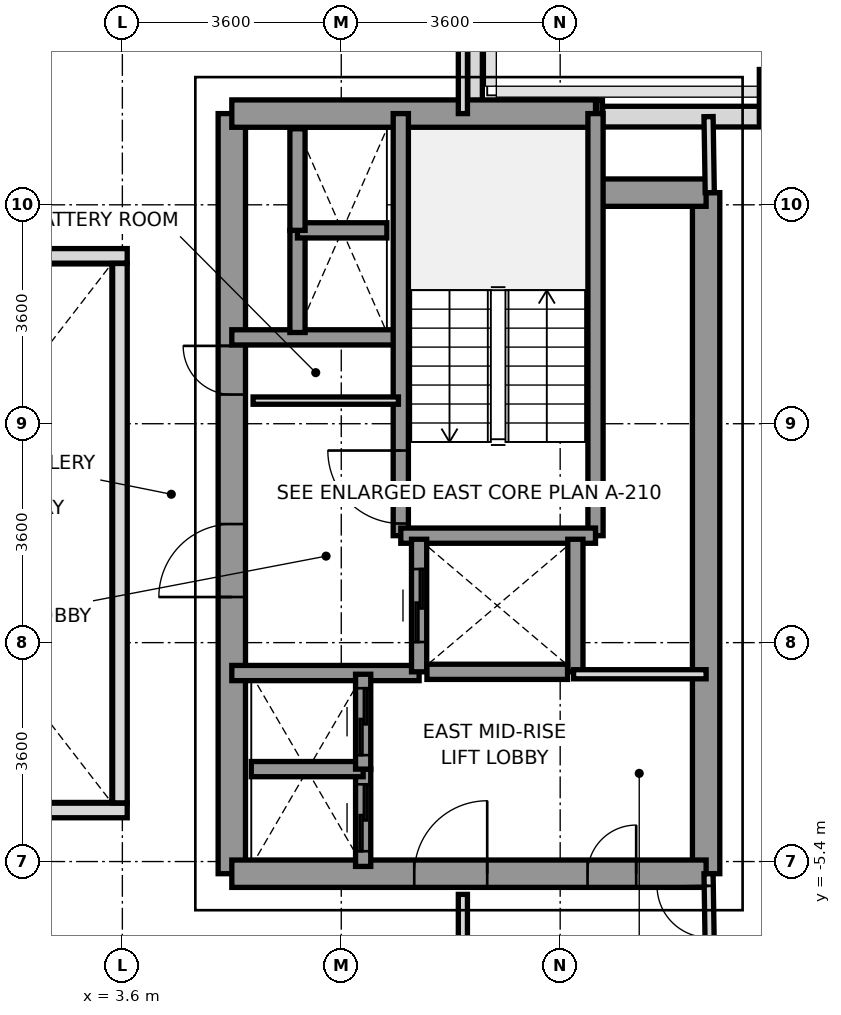
"""IFC4 building model, lengths in metres.
Left out: names, types, materials, properties, quantities, classifications, styles, units other than length and angle.
Written with IfcOpenShell. Run it as: python <this file> out.ifc"""

import sys

from ifc_helpers import new_model, si_unit, direction, frame, frame_2d, origin, origin_2d, place, context, subcontext, project, spatial, rectangle, extrude, source, transform, mapped, element, fill, save


model = new_model("IFC4")
c1 = context("Model", 3, precision=1e-05, world=origin(), true_north=direction((0.0, 1.0)))
c2 = subcontext(c1, "Body", "Model", "MODEL_VIEW")
j1 = project(units=[si_unit("LENGTHUNIT", "METRE"), si_unit("PLANEANGLEUNIT", "RADIAN")], contexts=[c1])
p1 = place(None, origin())
s1 = spatial("IfcSite", under=j1, at=p1, CompositionType="ELEMENT")
p2 = place(p1, origin())
s2 = spatial("IfcBuilding", under=s1, at=p2, CompositionType="ELEMENT")
p3 = place(p2, frame((0.0, 0.0, 138.0)))
s3 = spatial("IfcBuildingStorey", under=s2, at=p3, CompositionType="ELEMENT", Elevation=138.0)
m1 = source(origin(), c2, "Body", "SweptSolid", [
    extrude(rectangle(XDim=0.65, YDim=0.85, at=origin_2d()), origin(), (0.0, 0.0, 1.0), 3.2),
])
p4 = place(p3, frame((14.4, 7.2, 0.0), z_axis=(0.0, 0.0, 1.0), x_axis=(1.0, 0.0, 0.0)))
e1 = element("IfcColumn", 1, at=p4, inside=s3, PredefinedType="COLUMN", context=c2, shape_type="MappedRepresentation", body=[
    mapped(m1, transform((0.0, 0.0, 0.0), x_axis=(1.0, 0.0, 0.0), y_axis=(0.0, 1.0, 0.0), z_axis=(0.0, 0.0, 1.0), scale=1.0)),
])
p5 = place(p3, frame((11.498, 6.85, 0.0), z_axis=(0.0, 0.0, 1.0), x_axis=(1.0, 0.0, 0.0)))
e2 = element("IfcWall", 2, at=p5, inside=s3, PredefinedType="SOLIDWALL", context=c2, shape_type="SweptSolid", body=[
    extrude(rectangle(XDim=2.585, YDim=0.34, at=frame_2d((1.292, 0.0))), origin(), (0.0, 0.0, 1.0), 3.2),
])
p6 = place(p3, frame((9.4, 8.472, 0.0), z_axis=(0.0, 0.0, 1.0), x_axis=(0.0, -1.0, 0.0)))
e3 = element("IfcWall", 3, at=p6, inside=s3, PredefinedType="PARAPET", context=c2, shape_type="SweptSolid", body=[
    extrude(rectangle(XDim=1.519, YDim=0.24, at=frame_2d((0.76, 0.0))), origin(), (0.0, 0.0, 1.0), 1.15),
])
p7 = place(p3, frame((11.403, 7.0, 0.0), z_axis=(0.0, 0.0, 1.0), x_axis=(1.0, 0.0, 0.0)))
e4 = element("IfcWall", 4, at=p7, inside=s3, PredefinedType="PARAPET", context=c2, shape_type="SweptSolid", body=[
    extrude(rectangle(XDim=0.092, YDim=0.24, at=frame_2d((0.046, 0.0))), origin(), (0.0, 0.0, 1.0), 1.15),
])
p8 = place(p3, frame((13.2, -5.6, 0.0), z_axis=(0.0, 0.0, 1.0), x_axis=(0.0, 1.0, 0.0)))
e5 = element("IfcWall", 5, at=p8, inside=s3, PredefinedType="SHEAR", context=c2, shape_type="SweptSolid", body=[
    extrude(rectangle(XDim=11.2, YDim=0.45, at=frame_2d((5.6, 0.0))), origin(), (0.0, 0.0, 1.0), 3.2),
])
p9 = place(p3, frame((5.4, -5.6, 0.0), z_axis=(0.0, 0.0, 1.0), x_axis=(0.0, 1.0, 0.0)))
e6 = element("IfcWall", 6, at=p9, inside=s3, PredefinedType="SHEAR", context=c2, shape_type="SweptSolid", body=[
    extrude(rectangle(XDim=12.5, YDim=0.45, at=frame_2d((6.25, 0.0))), origin(), (0.0, 0.0, 1.0), 3.2),
])
p10 = place(p9, frame((4.55, 0.0, 0.0)))
e7 = element("IfcOpeningElement", 7, at=p10, cuts=e6, PredefinedType="OPENING", context=c2, shape_type="SweptSolid", body=[
    extrude(rectangle(XDim=1.2, YDim=2.2, at=frame_2d((0.6, 1.1))), frame((0.0, 0.235, 0.0), z_axis=(0.0, -1.0, 0.0), x_axis=(1.0, 0.0, 0.0)), (0.0, 0.0, 1.0), 0.47),
])
p11 = place(p9, frame((7.88, 0.0, 0.0)))
e8 = element("IfcOpeningElement", 8, at=p11, cuts=e6, PredefinedType="OPENING", context=c2, shape_type="SweptSolid", body=[
    extrude(rectangle(XDim=0.8, YDim=2.1, at=frame_2d((0.4, 1.05))), frame((0.0, 0.235, 0.0), z_axis=(0.0, -1.0, 0.0), x_axis=(1.0, 0.0, 0.0)), (0.0, 0.0, 1.0), 0.47),
])
p12 = place(p3, frame((5.4, 6.9, 0.0), z_axis=(0.0, 0.0, 1.0), x_axis=(1.0, 0.0, 0.0)))
e9 = element("IfcWall", 9, at=p12, inside=s3, PredefinedType="SHEAR", context=c2, shape_type="SweptSolid", body=[
    extrude(rectangle(XDim=5.981, YDim=0.45, at=frame_2d((2.991, 0.0))), origin(), (0.0, 0.0, 1.0), 3.2),
])
p13 = place(p3, frame((11.381, 5.6, 0.0), z_axis=(0.0, 0.0, 1.0), x_axis=(1.0, 0.0, 0.0)))
e10 = element("IfcWall", 10, at=p13, inside=s3, PredefinedType="SHEAR", context=c2, shape_type="SweptSolid", body=[
    extrude(rectangle(XDim=1.819, YDim=0.45, at=frame_2d((0.909, 0.0))), origin(), (0.0, 0.0, 1.0), 3.2),
])
p14 = place(p3, frame((5.4, -5.6, 0.0), z_axis=(0.0, 0.0, 1.0), x_axis=(1.0, 0.0, 0.0)))
e11 = element("IfcWall", 11, at=p14, inside=s3, PredefinedType="SHEAR", context=c2, shape_type="SweptSolid", body=[
    extrude(rectangle(XDim=7.8, YDim=0.45, at=frame_2d((3.9, 0.0))), origin(), (0.0, 0.0, 1.0), 3.2),
])
p15 = place(p14, frame((3.0, 0.0, 0.0)))
e12 = element("IfcOpeningElement", 12, at=p15, cuts=e11, PredefinedType="OPENING", context=c2, shape_type="SweptSolid", body=[
    extrude(rectangle(XDim=1.2, YDim=2.2, at=frame_2d((0.6, 1.1))), frame((0.0, 0.235, 0.0), z_axis=(0.0, -1.0, 0.0), x_axis=(1.0, 0.0, 0.0)), (0.0, 0.0, 1.0), 0.47),
])
p16 = place(p14, frame((5.85, 0.0, 0.0)))
e13 = element("IfcOpeningElement", 13, at=p16, cuts=e11, PredefinedType="OPENING", context=c2, shape_type="SweptSolid", body=[
    extrude(rectangle(XDim=0.8, YDim=2.1, at=frame_2d((0.4, 1.05))), frame((0.0, 0.235, 0.0), z_axis=(0.0, -1.0, 0.0), x_axis=(1.0, 0.0, 0.0)), (0.0, 0.0, 1.0), 0.47),
])
p17 = place(p3, frame((5.4, 3.22, 0.0), z_axis=(0.0, 0.0, 1.0), x_axis=(1.0, 0.0, 0.0)))
e14 = element("IfcWall", 14, at=p17, inside=s3, PredefinedType="SOLIDWALL", context=c2, shape_type="SweptSolid", body=[
    extrude(rectangle(XDim=2.78, YDim=0.25, at=frame_2d((1.39, 0.0))), origin(), (0.0, 0.0, 1.0), 3.2),
])
p18 = place(p3, frame((5.4, -2.3, 0.0), z_axis=(0.0, 0.0, 1.0), x_axis=(1.0, 0.0, 0.0)))
e15 = element("IfcWall", 15, at=p18, inside=s3, PredefinedType="SOLIDWALL", context=c2, shape_type="SweptSolid", body=[
    extrude(rectangle(XDim=3.08, YDim=0.25, at=frame_2d((1.54, 0.0))), origin(), (0.0, 0.0, 1.0), 3.2),
])
p19 = place(p3, frame((8.179, -0.041, 0.0), z_axis=(0.0, 0.0, 1.0), x_axis=(0.0, 1.0, 0.0)))
e16 = element("IfcWall", 16, at=p19, inside=s3, PredefinedType="SOLIDWALL", context=c2, shape_type="SweptSolid", body=[
    extrude(rectangle(XDim=6.941, YDim=0.25, at=frame_2d((3.47, 0.0))), origin(), (0.0, 0.0, 1.0), 3.2),
])
p20 = place(p19, frame((0.2, 0.0, 0.0)))
e17 = element("IfcOpeningElement", 17, at=p20, cuts=e16, PredefinedType="OPENING", context=c2, shape_type="SweptSolid", body=[
    extrude(rectangle(XDim=1.2, YDim=2.2, at=frame_2d((0.6, 1.1))), frame((0.0, 0.135, 0.0), z_axis=(0.0, -1.0, 0.0), x_axis=(1.0, 0.0, 0.0)), (0.0, 0.0, 1.0), 0.27),
])
p21 = place(p3, frame((11.381, -0.041, 0.0), z_axis=(0.0, 0.0, 1.0), x_axis=(0.0, 1.0, 0.0)))
e18 = element("IfcWall", 18, at=p21, inside=s3, PredefinedType="SOLIDWALL", context=c2, shape_type="SweptSolid", body=[
    extrude(rectangle(XDim=6.941, YDim=0.25, at=frame_2d((3.47, 0.0))), origin(), (0.0, 0.0, 1.0), 3.2),
])
p22 = place(p3, frame((8.179, -0.041, 0.0), z_axis=(0.0, 0.0, 1.0), x_axis=(1.0, 0.0, 0.0)))
e19 = element("IfcWall", 19, at=p22, inside=s3, PredefinedType="SOLIDWALL", context=c2, shape_type="SweptSolid", body=[
    extrude(rectangle(XDim=3.202, YDim=0.25, at=frame_2d((1.601, 0.0))), origin(), (0.0, 0.0, 1.0), 3.2),
])
p23 = place(p3, frame((8.48, -2.28, 0.0), z_axis=(0.0, 0.0, 1.0), x_axis=(0.0, 1.0, 0.0)))
e20 = element("IfcWall", 20, at=p23, inside=s3, PredefinedType="SOLIDWALL", context=c2, shape_type="SweptSolid", body=[
    extrude(rectangle(XDim=2.18, YDim=0.25, at=frame_2d((1.09, 0.0))), origin(), (0.0, 0.0, 1.0), 3.2),
])
p24 = place(p23, frame((0.49, 0.0, 0.0)))
e21 = element("IfcOpeningElement", 21, at=p24, cuts=e20, PredefinedType="OPENING", context=c2, shape_type="SweptSolid", body=[
    extrude(rectangle(XDim=1.2, YDim=2.2, at=frame_2d((0.6, 1.1))), frame((0.0, 0.135, 0.0), z_axis=(0.0, -1.0, 0.0), x_axis=(1.0, 0.0, 0.0)), (0.0, 0.0, 1.0), 0.27),
])
p25 = place(p3, frame((11.05, -2.28, 0.0), z_axis=(0.0, 0.0, 1.0), x_axis=(0.0, 1.0, 0.0)))
e22 = element("IfcWall", 22, at=p25, inside=s3, PredefinedType="SOLIDWALL", context=c2, shape_type="SweptSolid", body=[
    extrude(rectangle(XDim=2.18, YDim=0.25, at=frame_2d((1.09, 0.0))), origin(), (0.0, 0.0, 1.0), 3.2),
])
p26 = place(p3, frame((8.609, -2.28, 0.0), z_axis=(0.0, 0.0, 1.0), x_axis=(1.0, 0.0, 0.0)))
e23 = element("IfcWall", 23, at=p26, inside=s3, PredefinedType="SOLIDWALL", context=c2, shape_type="SweptSolid", body=[
    extrude(rectangle(XDim=2.312, YDim=0.25, at=frame_2d((1.156, 0.0))), origin(), (0.0, 0.0, 1.0), 3.2),
])
p27 = place(p3, frame((7.56, -5.48, 0.0), z_axis=(0.0, 0.0, 1.0), x_axis=(0.0, 1.0, 0.0)))
e24 = element("IfcWall", 24, at=p27, inside=s3, PredefinedType="SOLIDWALL", context=c2, shape_type="SweptSolid", body=[
    extrude(rectangle(XDim=1.6, YDim=0.25, at=frame_2d((0.8, 0.0))), origin(), (0.0, 0.0, 1.0), 3.2),
])
p28 = place(p27, frame((0.25, 0.0, 0.0)))
e25 = element("IfcOpeningElement", 25, at=p28, cuts=e24, PredefinedType="OPENING", context=c2, shape_type="SweptSolid", body=[
    extrude(rectangle(XDim=1.1, YDim=2.2, at=frame_2d((0.55, 1.1))), frame((0.0, 0.135, 0.0), z_axis=(0.0, -1.0, 0.0), x_axis=(1.0, 0.0, 0.0)), (0.0, 0.0, 1.0), 0.27),
])
p29 = place(p3, frame((5.72, -3.88, 0.0), z_axis=(0.0, 0.0, 1.0), x_axis=(1.0, 0.0, 0.0)))
e26 = element("IfcWall", 26, at=p29, inside=s3, PredefinedType="SOLIDWALL", context=c2, shape_type="SweptSolid", body=[
    extrude(rectangle(XDim=1.84, YDim=0.25, at=frame_2d((0.92, 0.0))), origin(), (0.0, 0.0, 1.0), 3.2),
])
p30 = place(p3, frame((7.56, -3.88, 0.0), z_axis=(0.0, 0.0, 1.0), x_axis=(0.0, 1.0, 0.0)))
e27 = element("IfcWall", 27, at=p30, inside=s3, PredefinedType="SOLIDWALL", context=c2, shape_type="SweptSolid", body=[
    extrude(rectangle(XDim=1.56, YDim=0.25, at=frame_2d((0.78, 0.0))), origin(), (0.0, 0.0, 1.0), 3.2),
])
p31 = place(p30, frame((0.23, 0.0, 0.0)))
e28 = element("IfcOpeningElement", 28, at=p31, cuts=e27, PredefinedType="OPENING", context=c2, shape_type="SweptSolid", body=[
    extrude(rectangle(XDim=1.1, YDim=2.2, at=frame_2d((0.55, 1.1))), frame((0.0, 0.135, 0.0), z_axis=(0.0, -1.0, 0.0), x_axis=(1.0, 0.0, 0.0)), (0.0, 0.0, 1.0), 0.27),
])
p32 = place(p3, frame((6.48, 3.3, 0.0), z_axis=(0.0, 0.0, 1.0), x_axis=(0.0, 1.0, 0.0)))
e29 = element("IfcWall", 29, at=p32, inside=s3, PredefinedType="SOLIDWALL", context=c2, shape_type="SweptSolid", body=[
    extrude(rectangle(XDim=1.68, YDim=0.25, at=frame_2d((0.84, 0.0))), origin(), (0.0, 0.0, 1.0), 3.2),
])
p33 = place(p3, frame((6.48, 4.98, 0.0), z_axis=(0.0, 0.0, 1.0), x_axis=(1.0, 0.0, 0.0)))
e30 = element("IfcWall", 30, at=p33, inside=s3, PredefinedType="SOLIDWALL", context=c2, shape_type="SweptSolid", body=[
    extrude(rectangle(XDim=1.47, YDim=0.25, at=frame_2d((0.735, 0.0))), origin(), (0.0, 0.0, 1.0), 3.2),
])
p34 = place(p3, frame((6.48, 4.98, 0.0), z_axis=(0.0, 0.0, 1.0), x_axis=(0.0, 1.0, 0.0)))
e31 = element("IfcWall", 31, at=p34, inside=s3, PredefinedType="SOLIDWALL", context=c2, shape_type="SweptSolid", body=[
    extrude(rectangle(XDim=1.67, YDim=0.25, at=frame_2d((0.835, 0.0))), origin(), (0.0, 0.0, 1.0), 3.2),
])
p35 = place(p3, frame((5.75, 2.18, 0.0), z_axis=(0.0, 0.0, 1.0), x_axis=(1.0, 0.0, 0.0)))
e32 = element("IfcWall", 32, at=p35, inside=s3, PredefinedType="PARTITIONING", context=c2, shape_type="SweptSolid", body=[
    extrude(rectangle(XDim=2.39, YDim=0.12, at=frame_2d((1.195, 0.0))), origin(), (0.0, 0.0, 1.0), 2.3),
])
p36 = place(p3, frame((11.02, -2.32, 0.0), z_axis=(0.0, 0.0, 1.0), x_axis=(1.0, 0.0, 0.0)))
e33 = element("IfcWall", 33, at=p36, inside=s3, PredefinedType="PARTITIONING", context=c2, shape_type="SweptSolid", body=[
    extrude(rectangle(XDim=2.18, YDim=0.15, at=frame_2d((1.09, 0.0))), origin(), (0.0, 0.0, 1.0), 3.2),
])
p37 = place(p3, frame((9.2, 6.9, 0.0), z_axis=(0.0, 0.0, 1.0), x_axis=(0.0, 1.0, 0.0)))
e34 = element("IfcWall", 34, at=p37, inside=s3, PredefinedType="PARTITIONING", context=c2, shape_type="SweptSolid", body=[
    extrude(rectangle(XDim=8.78, YDim=0.15, at=frame_2d((4.39, 0.0))), origin(), (0.0, 0.0, 1.0), 2.7),
])
p38 = place(p3, frame((9.2, -15.68, 0.0), z_axis=(0.0, 0.0, 1.0), x_axis=(0.0, 1.0, 0.0)))
e35 = element("IfcWall", 35, at=p38, inside=s3, PredefinedType="PARTITIONING", context=c2, shape_type="SweptSolid", body=[
    extrude(rectangle(XDim=9.74, YDim=0.15, at=frame_2d((4.87, 0.0))), origin(), (0.0, 0.0, 1.0), 2.7),
])
p39 = place(p3, frame((13.26, 5.6, 0.0), z_axis=(0.0, 0.0, 1.0), x_axis=(-0.016013571389, 0.999871774545, 0.0)))
e36 = element("IfcWall", 36, at=p39, inside=s3, PredefinedType="PARTITIONING", context=c2, shape_type="SweptSolid", body=[
    extrude(rectangle(XDim=1.25, YDim=0.15, at=frame_2d((0.625, 0.0))), origin(), (0.0, 0.0, 1.0), 3.2),
])
p40 = place(p3, frame((13.26, -6.85, 0.0), z_axis=(0.0, 0.0, 1.0), x_axis=(-0.016013571389, 0.999871774545, 0.0)))
e37 = element("IfcWall", 37, at=p40, inside=s3, PredefinedType="PARTITIONING", context=c2, shape_type="SweptSolid", body=[
    extrude(rectangle(XDim=1.25, YDim=0.15, at=frame_2d((0.625, 0.0))), origin(), (0.0, 0.0, 1.0), 3.2),
])
p41 = place(p40, frame((0.2, 0.0, 0.0)))
e38 = element("IfcOpeningElement", 38, at=p41, cuts=e37, PredefinedType="OPENING", context=c2, shape_type="SweptSolid", body=[
    extrude(rectangle(XDim=0.85, YDim=2.1, at=frame_2d((0.425, 1.05))), frame((0.0, 0.085, 0.0), z_axis=(0.0, -1.0, 0.0), x_axis=(1.0, 0.0, 0.0)), (0.0, 0.0, 1.0), 0.17),
])
for number, where, z_axis, x_axis in (
    (39, (-3.68, -4.56, 0.0), (0.0, 0.0, 1.0), (1.0, 0.0, 0.0)),
    (40, (-3.68, 4.56, 0.0), (0.0, 0.0, 1.0), (1.0, 0.0, 0.0)),
):
    element("IfcWall", number, at=place(p3, frame(where, z_axis=z_axis, x_axis=x_axis)), inside=s3, PredefinedType="PARAPET", context=c2, shape_type="SweptSolid", body=[
        extrude(rectangle(XDim=7.36, YDim=0.24, at=frame_2d((3.68, 0.0))), origin(), (0.0, 0.0, 1.0), 1.15),
    ])
p42 = place(p3, frame((3.56, -4.435, 0.0), z_axis=(0.0, 0.0, 1.0), x_axis=(0.0, 1.0, 0.0)))
e41 = element("IfcWall", 41, at=p42, inside=s3, PredefinedType="PARAPET", context=c2, shape_type="SweptSolid", body=[
    extrude(rectangle(XDim=8.87, YDim=0.24, at=frame_2d((4.435, 0.0))), origin(), (0.0, 0.0, 1.0), 1.15),
])
m2 = source(origin(), c2, "Body", "SweptSolid", [
    extrude(rectangle(XDim=1.2, YDim=2.2, at=frame_2d((0.6, 1.1))), frame((0.0, 0.025, 0.0), z_axis=(0.0, -1.0, 0.0), x_axis=(1.0, 0.0, 0.0)), (0.0, 0.0, 1.0), 0.05),
])
p43 = place(p20, origin())
e42 = element("IfcDoor", 42, at=p43, inside=s3, OperationType="SINGLE_SWING_RIGHT", PredefinedType="DOOR", context=c2, shape_type="MappedRepresentation", body=[
    mapped(m2, transform((0.0, 0.0, 0.0), x_axis=(1.0, 0.0, 0.0), y_axis=(0.0, 1.0, 0.0), z_axis=(0.0, 0.0, 1.0), scale=1.0)),
])
fill(e17, e42)
p44 = place(p10, origin())
e43 = element("IfcDoor", 43, at=p44, inside=s3, OperationType="SINGLE_SWING_LEFT", PredefinedType="DOOR", context=c2, shape_type="MappedRepresentation", body=[
    mapped(m2, transform((0.0, 0.0, 0.0), x_axis=(1.0, 0.0, 0.0), y_axis=(0.0, 1.0, 0.0), z_axis=(0.0, 0.0, 1.0), scale=1.0)),
])
fill(e7, e43)
p45 = place(p15, origin())
e44 = element("IfcDoor", 44, at=p45, inside=s3, OperationType="SINGLE_SWING_RIGHT", PredefinedType="DOOR", context=c2, shape_type="MappedRepresentation", body=[
    mapped(m2, transform((0.0, 0.0, 0.0), x_axis=(1.0, 0.0, 0.0), y_axis=(0.0, 1.0, 0.0), z_axis=(0.0, 0.0, 1.0), scale=1.0)),
])
fill(e12, e44)
m3 = source(origin(), c2, "Body", "SweptSolid", [
    extrude(rectangle(XDim=0.8, YDim=2.1, at=frame_2d((0.4, 1.05))), frame((0.0, 0.025, 0.0), z_axis=(0.0, -1.0, 0.0), x_axis=(1.0, 0.0, 0.0)), (0.0, 0.0, 1.0), 0.05),
])
p46 = place(p11, origin())
e45 = element("IfcDoor", 45, at=p46, inside=s3, OperationType="SINGLE_SWING_RIGHT", PredefinedType="DOOR", context=c2, shape_type="MappedRepresentation", body=[
    mapped(m3, transform((0.0, 0.0, 0.0), x_axis=(1.0, 0.0, 0.0), y_axis=(0.0, 1.0, 0.0), z_axis=(0.0, 0.0, 1.0), scale=1.0)),
])
fill(e8, e45)
p47 = place(p16, origin())
e46 = element("IfcDoor", 46, at=p47, inside=s3, OperationType="SINGLE_SWING_RIGHT", PredefinedType="DOOR", context=c2, shape_type="MappedRepresentation", body=[
    mapped(m3, transform((0.0, 0.0, 0.0), x_axis=(1.0, 0.0, 0.0), y_axis=(0.0, 1.0, 0.0), z_axis=(0.0, 0.0, 1.0), scale=1.0)),
])
fill(e13, e46)
p48 = place(p24, origin())
e47 = element("IfcDoor", 47, at=p48, inside=s3, OperationType="SLIDING_TO_RIGHT", PredefinedType="DOOR", context=c2, shape_type="MappedRepresentation", body=[
    mapped(m2, transform((0.0, 0.0, 0.0), x_axis=(1.0, 0.0, 0.0), y_axis=(0.0, 1.0, 0.0), z_axis=(0.0, 0.0, 1.0), scale=1.0)),
])
fill(e21, e47)
m4 = source(origin(), c2, "Body", "SweptSolid", [
    extrude(rectangle(XDim=1.1, YDim=2.2, at=frame_2d((0.55, 1.1))), frame((0.0, 0.025, 0.0), z_axis=(0.0, -1.0, 0.0), x_axis=(1.0, 0.0, 0.0)), (0.0, 0.0, 1.0), 0.05),
])
p49 = place(p28, origin())
e48 = element("IfcDoor", 48, at=p49, inside=s3, OperationType="SLIDING_TO_LEFT", PredefinedType="DOOR", context=c2, shape_type="MappedRepresentation", body=[
    mapped(m4, transform((0.0, 0.0, 0.0), x_axis=(1.0, 0.0, 0.0), y_axis=(0.0, 1.0, 0.0), z_axis=(0.0, 0.0, 1.0), scale=1.0)),
])
fill(e25, e48)
p50 = place(p31, origin())
e49 = element("IfcDoor", 49, at=p50, inside=s3, OperationType="SLIDING_TO_LEFT", PredefinedType="DOOR", context=c2, shape_type="MappedRepresentation", body=[
    mapped(m4, transform((0.0, 0.0, 0.0), x_axis=(1.0, 0.0, 0.0), y_axis=(0.0, 1.0, 0.0), z_axis=(0.0, 0.0, 1.0), scale=1.0)),
])
fill(e28, e49)
m5 = source(origin(), c2, "Body", "SweptSolid", [
    extrude(rectangle(XDim=0.85, YDim=2.1, at=frame_2d((0.425, 1.05))), frame((0.0, 0.025, 0.0), z_axis=(0.0, -1.0, 0.0), x_axis=(1.0, 0.0, 0.0)), (0.0, 0.0, 1.0), 0.05),
])
p51 = place(p41, origin())
e50 = element("IfcDoor", 50, at=p51, inside=s3, OperationType="SINGLE_SWING_RIGHT", PredefinedType="DOOR", context=c2, shape_type="MappedRepresentation", body=[
    mapped(m5, transform((0.0, 0.0, 0.0), x_axis=(1.0, 0.0, 0.0), y_axis=(0.0, 1.0, 0.0), z_axis=(0.0, 0.0, 1.0), scale=1.0)),
])
fill(e38, e50)
save(model, sys.argv[1])
